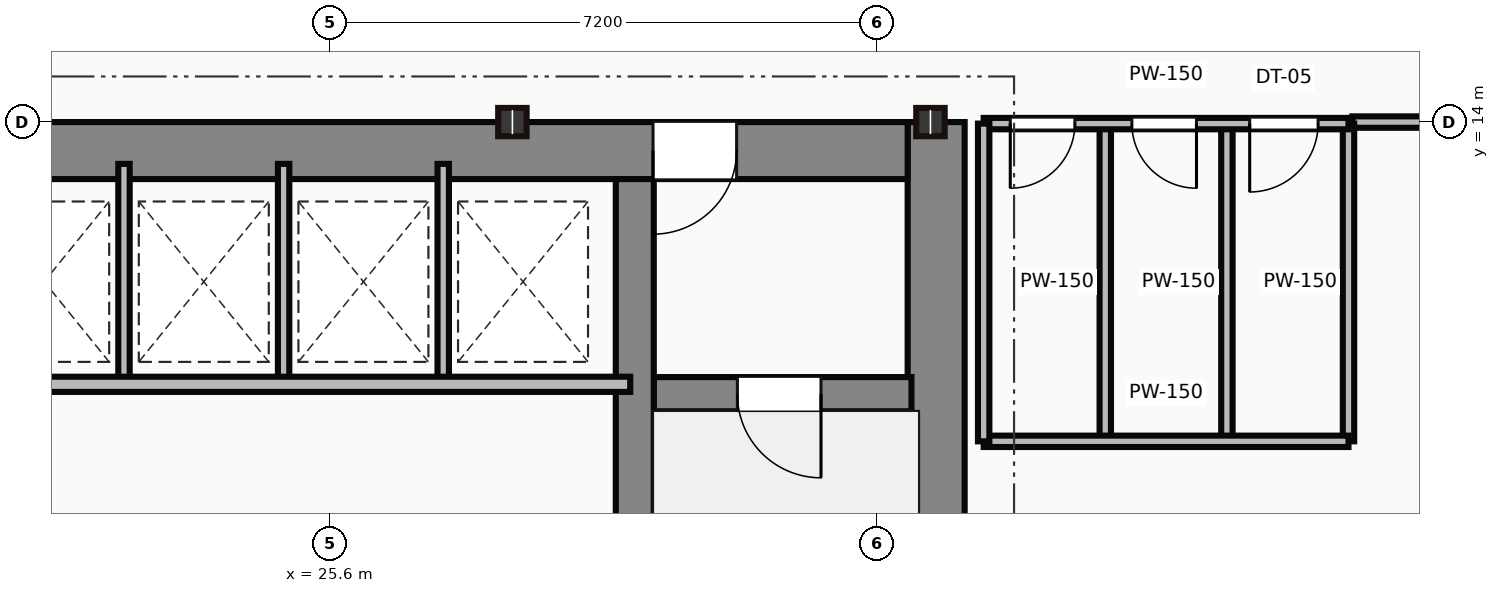
"""IFC4 building model, lengths in metres.
Left out: names, types, materials, properties, quantities, classifications, styles, units other than length and angle.
Written with IfcOpenShell. Run it as: python <this file> out.ifc"""

import sys

from ifc_helpers import new_model, si_unit, direction, frame, frame_2d, origin, origin_2d, place, context, subcontext, project, spatial, rectangle, i_section, extrude, source, transform, mapped, element, fill, save


model = new_model("IFC4")
c1 = context("Model", 3, precision=1e-05, world=origin(), true_north=direction((0.0, 1.0)))
c2 = subcontext(c1, "Body", "Model", "MODEL_VIEW")
j1 = project(units=[si_unit("LENGTHUNIT", "METRE"), si_unit("PLANEANGLEUNIT", "RADIAN")], contexts=[c1])
p1 = place(None, origin())
s1 = spatial("IfcSite", under=j1, at=p1, CompositionType="ELEMENT")
p2 = place(p1, origin())
s2 = spatial("IfcBuilding", under=s1, at=p2, CompositionType="ELEMENT")
p3 = place(p2, frame((0.0, 0.0, 180.75)))
s3 = spatial("IfcBuildingStorey", under=s2, at=p3, CompositionType="ELEMENT", Elevation=180.75)
m1 = source(origin(), c2, "Body", "SweptSolid", [
    extrude(rectangle(XDim=13.1, YDim=0.75, at=frame_2d((6.55, 0.0))), origin(), (0.0, 0.0, 1.0), 3.65),
])
p4 = place(p3, frame((33.575, 0.9, 0.0), z_axis=(0.0, 0.0, 1.0), x_axis=(0.0, 1.0, 0.0)))
e1 = element("IfcWall", 1, at=p4, inside=s3, PredefinedType="SHEAR", context=c2, shape_type="MappedRepresentation", body=[
    mapped(m1, transform((0.0, 0.0, 0.0))),
])
m2 = source(origin(), c2, "Body", "SweptSolid", [
    extrude(rectangle(XDim=12.6, YDim=0.75, at=frame_2d((6.3, 0.0))), origin(), (0.0, 0.0, 1.0), 3.65),
])
p5 = place(p3, frame((20.6, 13.625, 0.0), z_axis=(0.0, 0.0, 1.0), x_axis=(1.0, 0.0, 0.0)))
e2 = element("IfcWall", 2, at=p5, inside=s3, PredefinedType="SHEAR", context=c2, shape_type="MappedRepresentation", body=[
    mapped(m2, transform((0.0, 0.0, 0.0))),
])
p6 = place(p5, frame((9.25, 0.0, 0.0)))
e3 = element("IfcOpeningElement", 3, at=p6, cuts=e2, PredefinedType="OPENING", context=c2, shape_type="SweptSolid", body=[
    extrude(rectangle(XDim=1.1, YDim=2.15, at=frame_2d((0.55, 1.075))), frame((0.0, 0.385, 0.0), z_axis=(0.0, -1.0, 0.0), x_axis=(1.0, 0.0, 0.0)), (0.0, 0.0, 1.0), 0.77),
])
m3 = source(origin(), c2, "Body", "SweptSolid", [
    extrude(rectangle(XDim=12.35, YDim=0.5, at=frame_2d((6.175, 0.0))), origin(), (0.0, 0.0, 1.0), 3.65),
])
p7 = place(p3, frame((29.61, 0.9, 0.0), z_axis=(0.0, 0.0, 1.0), x_axis=(0.0, 1.0, 0.0)))
e4 = element("IfcWall", 4, at=p7, inside=s3, PredefinedType="SHEAR", context=c2, shape_type="MappedRepresentation", body=[
    mapped(m3, transform((0.0, 0.0, 0.0))),
])
m4 = source(origin(), c2, "Body", "SweptSolid", [
    extrude(rectangle(XDim=3.39, YDim=0.45, at=frame_2d((1.695, 0.0))), origin(), (0.0, 0.0, 1.0), 3.65),
])
p8 = place(p3, frame((29.86, 10.42, 0.0), z_axis=(0.0, 0.0, 1.0), x_axis=(1.0, 0.0, 0.0)))
e5 = element("IfcWall", 5, at=p8, inside=s3, PredefinedType="SHEAR", context=c2, shape_type="MappedRepresentation", body=[
    mapped(m4, transform((0.0, 0.0, 0.0))),
])
p9 = place(p8, frame((1.1, 0.0, 0.0)))
e6 = element("IfcOpeningElement", 6, at=p9, cuts=e5, PredefinedType="OPENING", context=c2, shape_type="SweptSolid", body=[
    extrude(rectangle(XDim=1.1, YDim=2.15, at=frame_2d((0.55, 1.075))), frame((0.0, 0.235, 0.0), z_axis=(0.0, -1.0, 0.0), x_axis=(1.0, 0.0, 0.0)), (0.0, 0.0, 1.0), 0.47),
])
m5 = source(origin(), c2, "Body", "SweptSolid", [
    extrude(i_section(OverallWidth=0.374, OverallDepth=0.372, WebThickness=0.016, FlangeThickness=0.026, at=origin_2d()), origin(), (0.0, 0.0, 1.0), 3.65),
])
for number, where, z_axis, x_axis in (
    (7, (28.0, 14.0, 0.0), (0.0, 0.0, 1.0), (1.0, 0.0, 0.0)),
    (8, (33.5, 14.0, 0.0), (0.0, 0.0, 1.0), (1.0, 0.0, 0.0)),
):
    element("IfcColumn", number, at=place(p3, frame(where, z_axis=z_axis, x_axis=x_axis)), inside=s3, PredefinedType="COLUMN", context=c2, shape_type="MappedRepresentation", body=[
        mapped(m5, transform((0.0, 0.0, 0.0))),
    ])
m6 = source(origin(), c2, "Body", "SweptSolid", [
    extrude(rectangle(XDim=8.8, YDim=0.2, at=frame_2d((4.4, 0.0))), origin(), (0.0, 0.0, 1.0), 3.4),
])
p10 = place(p3, frame((20.75, 10.55, 0.0), z_axis=(0.0, 0.0, 1.0), x_axis=(1.0, 0.0, 0.0)))
e9 = element("IfcWall", 9, at=p10, inside=s3, PredefinedType="PARTITIONING", context=c2, shape_type="MappedRepresentation", body=[
    mapped(m6, transform((0.0, 0.0, 0.0))),
])
m7 = source(origin(), c2, "Body", "SweptSolid", [
    extrude(rectangle(XDim=2.85, YDim=0.15, at=frame_2d((1.425, 0.0))), origin(), (0.0, 0.0, 1.0), 3.4),
])
for number, where, z_axis, x_axis in (
    (10, (22.89, 10.6, 0.0), (0.0, 0.0, 1.0), (0.0, 1.0, 0.0)),
    (11, (24.99, 10.6, 0.0), (0.0, 0.0, 1.0), (0.0, 1.0, 0.0)),
    (12, (27.09, 10.6, 0.0), (0.0, 0.0, 1.0), (0.0, 1.0, 0.0)),
):
    element("IfcWall", number, at=place(p3, frame(where, z_axis=z_axis, x_axis=x_axis)), inside=s3, PredefinedType="PARTITIONING", context=c2, shape_type="MappedRepresentation", body=[
        mapped(m7, transform((0.0, 0.0, 0.0))),
    ])
m8 = source(origin(), c2, "Body", "SweptSolid", [
    extrude(rectangle(XDim=4.8, YDim=0.15, at=frame_2d((2.4, 0.0))), origin(), (0.0, 0.0, 1.0), 2.76),
])
p11 = place(p3, frame((34.2, 13.98, 0.0), z_axis=(0.0, 0.0, 1.0), x_axis=(1.0, 0.0, 0.0)))
e13 = element("IfcWall", 13, at=p11, inside=s3, PredefinedType="PARTITIONING", context=c2, shape_type="MappedRepresentation", body=[
    mapped(m8, transform((0.0, 0.0, 0.0))),
])
p12 = place(p11, frame((0.35, 0.0, 0.0)))
e14 = element("IfcOpeningElement", 14, at=p12, cuts=e13, PredefinedType="OPENING", context=c2, shape_type="SweptSolid", body=[
    extrude(rectangle(XDim=0.85, YDim=2.1, at=frame_2d((0.425, 1.05))), frame((0.0, 0.085, 0.0), z_axis=(0.0, -1.0, 0.0), x_axis=(1.0, 0.0, 0.0)), (0.0, 0.0, 1.0), 0.17),
])
p13 = place(p11, frame((1.95, 0.0, 0.0)))
e15 = element("IfcOpeningElement", 15, at=p13, cuts=e13, PredefinedType="OPENING", context=c2, shape_type="SweptSolid", body=[
    extrude(rectangle(XDim=0.85, YDim=2.1, at=frame_2d((0.425, 1.05))), frame((0.0, 0.085, 0.0), z_axis=(0.0, -1.0, 0.0), x_axis=(1.0, 0.0, 0.0)), (0.0, 0.0, 1.0), 0.17),
])
p14 = place(p11, frame((3.5, 0.0, 0.0)))
e16 = element("IfcOpeningElement", 16, at=p14, cuts=e13, PredefinedType="OPENING", context=c2, shape_type="SweptSolid", body=[
    extrude(rectangle(XDim=0.9, YDim=2.1, at=frame_2d((0.45, 1.05))), frame((0.0, 0.085, 0.0), z_axis=(0.0, -1.0, 0.0), x_axis=(1.0, 0.0, 0.0)), (0.0, 0.0, 1.0), 0.17),
])
m9 = source(origin(), c2, "Body", "SweptSolid", [
    extrude(rectangle(XDim=4.8, YDim=0.15, at=frame_2d((2.4, 0.0))), origin(), (0.0, 0.0, 1.0), 3.4),
])
p15 = place(p3, frame((34.2, 9.8, 0.0), z_axis=(0.0, 0.0, 1.0), x_axis=(1.0, 0.0, 0.0)))
e17 = element("IfcWall", 17, at=p15, inside=s3, PredefinedType="PARTITIONING", context=c2, shape_type="MappedRepresentation", body=[
    mapped(m9, transform((0.0, 0.0, 0.0))),
])
m10 = source(origin(), c2, "Body", "SweptSolid", [
    extrude(rectangle(XDim=4.18, YDim=0.15, at=frame_2d((2.09, 0.0))), origin(), (0.0, 0.0, 1.0), 3.4),
])
for number, where, z_axis, x_axis in (
    (18, (39.0, 9.8, 0.0), (0.0, 0.0, 1.0), (0.0, 1.0, 0.0)),
    (19, (34.2, 9.8, 0.0), (0.0, 0.0, 1.0), (0.0, 1.0, 0.0)),
    (20, (35.8, 9.8, 0.0), (0.0, 0.0, 1.0), (0.0, 1.0, 0.0)),
    (21, (37.4, 9.8, 0.0), (0.0, 0.0, 1.0), (0.0, 1.0, 0.0)),
):
    element("IfcWall", number, at=place(p3, frame(where, z_axis=z_axis, x_axis=x_axis)), inside=s3, PredefinedType="PARTITIONING", context=c2, shape_type="MappedRepresentation", body=[
        mapped(m10, transform((0.0, 0.0, 0.0))),
    ])
m11 = source(origin(), c2, "Body", "SweptSolid", [
    extrude(rectangle(XDim=1.75, YDim=0.15, at=frame_2d((0.875, 0.0))), origin(), (0.0, 0.0, 1.0), 2.76),
])
p16 = place(p3, frame((40.8, 14.0, 0.0), z_axis=(0.0, 0.0, 1.0), x_axis=(-1.0, 0.0, 0.0)))
e22 = element("IfcWall", 22, at=p16, inside=s3, PredefinedType="PARTITIONING", context=c2, shape_type="MappedRepresentation", body=[
    mapped(m11, transform((0.0, 0.0, 0.0))),
])
m12 = source(origin(), c2, "Body", "SweptSolid", [
    extrude(rectangle(XDim=1.1, YDim=2.15, at=frame_2d((0.55, 1.075))), frame((0.0, 0.025, 0.0), z_axis=(0.0, -1.0, 0.0), x_axis=(1.0, 0.0, 0.0)), (0.0, 0.0, 1.0), 0.05),
])
p17 = place(p9, frame((1.1, 0.0, 0.0), z_axis=(0.0, 0.0, 1.0), x_axis=(-1.0, 0.0, 0.0)))
e23 = element("IfcDoor", 23, at=p17, inside=s3, OperationType="SINGLE_SWING_RIGHT", PredefinedType="DOOR", context=c2, shape_type="MappedRepresentation", body=[
    mapped(m12, transform((0.0, 0.0, 0.0))),
])
fill(e6, e23)
p18 = place(p6, origin())
e24 = element("IfcDoor", 24, at=p18, inside=s3, OperationType="SINGLE_SWING_LEFT", PredefinedType="DOOR", context=c2, shape_type="MappedRepresentation", body=[
    mapped(m12, transform((0.0, 0.0, 0.0))),
])
fill(e3, e24)
m13 = source(origin(), c2, "Body", "SweptSolid", [
    extrude(rectangle(XDim=0.85, YDim=2.1, at=frame_2d((0.425, 1.05))), frame((0.0, 0.025, 0.0), z_axis=(0.0, -1.0, 0.0), x_axis=(1.0, 0.0, 0.0)), (0.0, 0.0, 1.0), 0.05),
])
p19 = place(p12, frame((0.85, 0.0, 0.0), z_axis=(0.0, 0.0, 1.0), x_axis=(-1.0, 0.0, 0.0)))
e25 = element("IfcDoor", 25, at=p19, inside=s3, OperationType="SINGLE_SWING_LEFT", PredefinedType="DOOR", context=c2, shape_type="MappedRepresentation", body=[
    mapped(m13, transform((0.0, 0.0, 0.0))),
])
fill(e14, e25)
p20 = place(p13, frame((0.85, 0.0, 0.0), z_axis=(0.0, 0.0, 1.0), x_axis=(-1.0, 0.0, 0.0)))
e26 = element("IfcDoor", 26, at=p20, inside=s3, OperationType="SINGLE_SWING_RIGHT", PredefinedType="DOOR", context=c2, shape_type="MappedRepresentation", body=[
    mapped(m13, transform((0.0, 0.0, 0.0))),
])
fill(e15, e26)
m14 = source(origin(), c2, "Body", "SweptSolid", [
    extrude(rectangle(XDim=0.9, YDim=2.1, at=frame_2d((0.45, 1.05))), frame((0.0, 0.025, 0.0), z_axis=(0.0, -1.0, 0.0), x_axis=(1.0, 0.0, 0.0)), (0.0, 0.0, 1.0), 0.05),
])
p21 = place(p14, frame((0.9, 0.0, 0.0), z_axis=(0.0, 0.0, 1.0), x_axis=(-1.0, 0.0, 0.0)))
e27 = element("IfcDoor", 27, at=p21, inside=s3, OperationType="SINGLE_SWING_LEFT", PredefinedType="DOOR", context=c2, shape_type="MappedRepresentation", body=[
    mapped(m14, transform((0.0, 0.0, 0.0))),
])
fill(e16, e27)
save(model, sys.argv[1])
